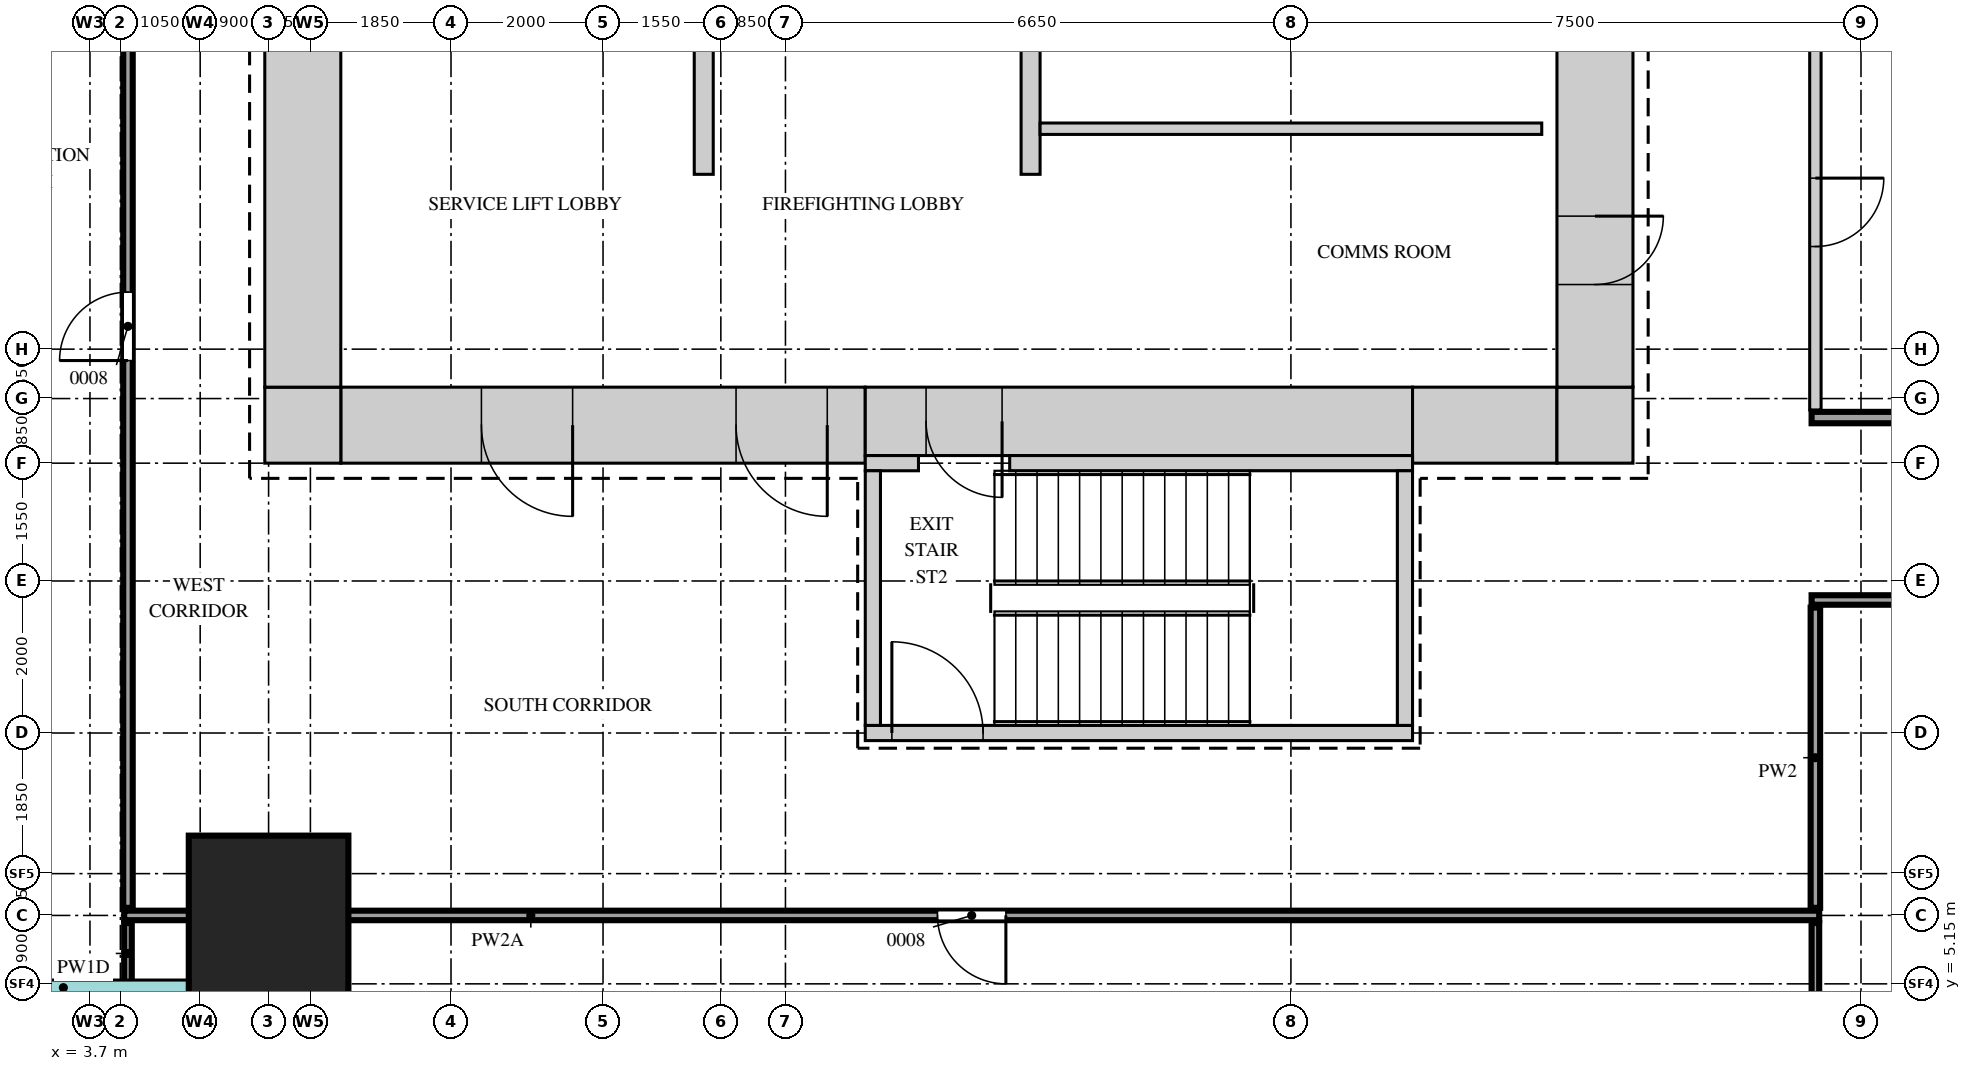
"""IFC4 building model, lengths in metres.
Left out: names, types, materials, properties, quantities, classifications, styles, units other than length and angle.
Written with IfcOpenShell. Run it as: python <this file> out.ifc"""

import sys

from ifc_helpers import new_model, si_unit, direction, frame, frame_2d, origin, origin_2d, place, context, subcontext, project, spatial, rectangle, extrude, source, transform, mapped, element, fill, save


model = new_model("IFC4")
c1 = context("Model", 3, precision=1e-05, world=origin(), true_north=direction((0.0, 1.0)))
c2 = subcontext(c1, "Body", "Model", "MODEL_VIEW")
j1 = project(units=[si_unit("LENGTHUNIT", "METRE"), si_unit("PLANEANGLEUNIT", "RADIAN")], contexts=[c1])
p1 = place(None, origin())
s1 = spatial("IfcSite", under=j1, at=p1, CompositionType="ELEMENT")
p2 = place(p1, origin())
s2 = spatial("IfcBuilding", under=s1, at=p2, CompositionType="ELEMENT")
p3 = place(p2, frame((0.0, 0.0, 136.7)))
s3 = spatial("IfcBuildingStorey", under=s2, at=p3, CompositionType="ELEMENT", Elevation=136.7)
m1 = source(origin(), c2, "Body", "SweptSolid", [
    extrude(rectangle(XDim=6.9, YDim=1.0, at=frame_2d((3.45, 0.0))), origin(), (0.0, 0.0, 1.0), 4.1),
])
p4 = place(p3, frame((7.0, 12.5, 0.0), z_axis=(0.0, 0.0, 1.0), x_axis=(1.0, 0.0, 0.0)))
e1 = element("IfcWall", 1, at=p4, inside=s3, PredefinedType="SHEAR", context=c2, shape_type="MappedRepresentation", body=[
    mapped(m1, transform((0.0, 0.0, 0.0))),
])
m2 = source(origin(), c2, "Body", "SweptSolid", [
    extrude(rectangle(XDim=1.2, YDim=2.1, at=frame_2d((0.6, 1.05))), frame((0.0, 0.51, 0.0), z_axis=(0.0, -1.0, 0.0), x_axis=(1.0, 0.0, 0.0)), (0.0, 0.0, 1.0), 1.02),
])
p5 = place(p4, frame((5.2, 0.0, 0.0)))
e2 = element("IfcOpeningElement", 2, at=p5, cuts=e1, PredefinedType="OPENING", context=c2, shape_type="MappedRepresentation", body=[
    mapped(m2, transform((0.0, 0.0, 0.0))),
])
p6 = place(p4, frame((1.85, 0.0, 0.0)))
e3 = element("IfcOpeningElement", 3, at=p6, cuts=e1, PredefinedType="OPENING", context=c2, shape_type="MappedRepresentation", body=[
    mapped(m2, transform((0.0, 0.0, 0.0))),
])
m3 = source(origin(), c2, "Body", "SweptSolid", [
    extrude(rectangle(XDim=7.2, YDim=0.9, at=frame_2d((3.6, 0.0))), origin(), (0.0, 0.0, 1.0), 4.1),
])
p7 = place(p3, frame((13.9, 12.55, 0.0), z_axis=(0.0, 0.0, 1.0), x_axis=(1.0, 0.0, 0.0)))
e4 = element("IfcWall", 4, at=p7, inside=s3, PredefinedType="SHEAR", context=c2, shape_type="MappedRepresentation", body=[
    mapped(m3, transform((0.0, 0.0, 0.0))),
])
m4 = source(origin(), c2, "Body", "SweptSolid", [
    extrude(rectangle(XDim=1.0, YDim=2.1, at=frame_2d((0.5, 1.05))), frame((0.0, 0.46, 0.0), z_axis=(0.0, -1.0, 0.0), x_axis=(1.0, 0.0, 0.0)), (0.0, 0.0, 1.0), 0.92),
])
p8 = place(p7, frame((0.8, 0.0, 0.0)))
e5 = element("IfcOpeningElement", 5, at=p8, cuts=e4, PredefinedType="OPENING", context=c2, shape_type="MappedRepresentation", body=[
    mapped(m4, transform((0.0, 0.0, 0.0))),
])
m5 = source(origin(), c2, "Body", "SweptSolid", [
    extrude(rectangle(XDim=1.9, YDim=1.0, at=frame_2d((0.95, 0.0))), origin(), (0.0, 0.0, 1.0), 4.1),
])
p9 = place(p3, frame((21.1, 12.5, 0.0), z_axis=(0.0, 0.0, 1.0), x_axis=(1.0, 0.0, 0.0)))
e6 = element("IfcWall", 6, at=p9, inside=s3, PredefinedType="SHEAR", context=c2, shape_type="MappedRepresentation", body=[
    mapped(m5, transform((0.0, 0.0, 0.0))),
])
m6 = source(origin(), c2, "Body", "SweptSolid", [
    extrude(rectangle(XDim=1.0, YDim=1.0, at=frame_2d((0.5, 0.0))), origin(), (0.0, 0.0, 1.0), 4.1),
])
for number, where, z_axis, x_axis in (
    (7, (23.0, 12.5, 0.0), (0.0, 0.0, 1.0), (1.0, 0.0, 0.0)),
    (8, (6.0, 12.5, 0.0), (0.0, 0.0, 1.0), (1.0, 0.0, 0.0)),
):
    element("IfcWall", number, at=place(p3, frame(where, z_axis=z_axis, x_axis=x_axis)), inside=s3, PredefinedType="SHEAR", context=c2, shape_type="MappedRepresentation", body=[
        mapped(m6, transform((0.0, 0.0, 0.0))),
    ])
m7 = source(origin(), c2, "Body", "SweptSolid", [
    extrude(rectangle(XDim=28.0, YDim=1.0, at=frame_2d((14.0, 0.0))), origin(), (0.0, 0.0, 1.0), 4.1),
])
p10 = place(p3, frame((23.5, 13.0, 0.0), z_axis=(0.0, 0.0, 1.0), x_axis=(0.0, 1.0, 0.0)))
e9 = element("IfcWall", 9, at=p10, inside=s3, PredefinedType="SHEAR", context=c2, shape_type="MappedRepresentation", body=[
    mapped(m7, transform((0.0, 0.0, 0.0))),
])
m8 = source(origin(), c2, "Body", "SweptSolid", [
    extrude(rectangle(XDim=1.8, YDim=2.1, at=frame_2d((0.9, 1.05))), frame((0.0, 0.51, 0.0), z_axis=(0.0, -1.0, 0.0), x_axis=(1.0, 0.0, 0.0)), (0.0, 0.0, 1.0), 1.02),
])
p11 = place(p10, frame((22.6, 0.0, 0.0)))
e10 = element("IfcOpeningElement", 10, at=p11, cuts=e9, PredefinedType="OPENING", context=c2, shape_type="MappedRepresentation", body=[
    mapped(m8, transform((0.0, 0.0, 0.0))),
])
p12 = place(p10, frame((15.35, 0.0, 0.0)))
e11 = element("IfcOpeningElement", 11, at=p12, cuts=e9, PredefinedType="OPENING", context=c2, shape_type="MappedRepresentation", body=[
    mapped(m2, transform((0.0, 0.0, 0.0))),
])
m9 = source(origin(), c2, "Body", "SweptSolid", [
    extrude(rectangle(XDim=0.9, YDim=2.1, at=frame_2d((0.45, 1.05))), frame((0.0, 0.51, 0.0), z_axis=(0.0, -1.0, 0.0), x_axis=(1.0, 0.0, 0.0)), (0.0, 0.0, 1.0), 1.02),
])
p13 = place(p10, frame((1.35, 0.0, 0.0)))
e12 = element("IfcOpeningElement", 12, at=p13, cuts=e9, PredefinedType="OPENING", context=c2, shape_type="MappedRepresentation", body=[
    mapped(m9, transform((0.0, 0.0, 0.0))),
])
p14 = place(p10, frame((4.55, 0.0, 0.0)))
e13 = element("IfcOpeningElement", 13, at=p14, cuts=e9, PredefinedType="OPENING", context=c2, shape_type="MappedRepresentation", body=[
    mapped(m9, transform((0.0, 0.0, 0.0))),
])
p15 = place(p10, frame((7.8, 0.0, 0.0)))
e14 = element("IfcOpeningElement", 14, at=p15, cuts=e9, PredefinedType="OPENING", context=c2, shape_type="MappedRepresentation", body=[
    mapped(m9, transform((0.0, 0.0, 0.0))),
])
p16 = place(p3, frame((6.5, 13.0, 0.0), z_axis=(0.0, 0.0, 1.0), x_axis=(0.0, 1.0, 0.0)))
e15 = element("IfcWall", 15, at=p16, inside=s3, PredefinedType="SHEAR", context=c2, shape_type="MappedRepresentation", body=[
    mapped(m7, transform((0.0, 0.0, 0.0))),
])
m10 = source(origin(), c2, "Body", "SweptSolid", [
    extrude(rectangle(XDim=0.7, YDim=0.2, at=frame_2d((0.35, 0.0))), origin(), (0.0, 0.0, 1.0), 4.1),
])
p17 = place(p3, frame((13.9, 12.0, 0.0), z_axis=(0.0, 0.0, 1.0), x_axis=(1.0, 0.0, 0.0)))
e16 = element("IfcWall", 16, at=p17, inside=s3, PredefinedType="SHEAR", context=c2, shape_type="MappedRepresentation", body=[
    mapped(m10, transform((0.0, 0.0, 0.0))),
])
m11 = source(origin(), c2, "Body", "SweptSolid", [
    extrude(rectangle(XDim=5.3, YDim=0.2, at=frame_2d((2.65, 0.0))), origin(), (0.0, 0.0, 1.0), 4.1),
])
p18 = place(p3, frame((15.8, 12.0, 0.0), z_axis=(0.0, 0.0, 1.0), x_axis=(1.0, 0.0, 0.0)))
e17 = element("IfcWall", 17, at=p18, inside=s3, PredefinedType="SHEAR", context=c2, shape_type="MappedRepresentation", body=[
    mapped(m11, transform((0.0, 0.0, 0.0))),
])
m12 = source(origin(), c2, "Body", "SweptSolid", [
    extrude(rectangle(XDim=7.2, YDim=0.2, at=frame_2d((3.6, 0.0))), origin(), (0.0, 0.0, 1.0), 4.1),
])
p19 = place(p3, frame((13.9, 8.45, 0.0), z_axis=(0.0, 0.0, 1.0), x_axis=(1.0, 0.0, 0.0)))
e18 = element("IfcWall", 18, at=p19, inside=s3, PredefinedType="SHEAR", context=c2, shape_type="MappedRepresentation", body=[
    mapped(m12, transform((0.0, 0.0, 0.0))),
])
m13 = source(origin(), c2, "Body", "SweptSolid", [
    extrude(rectangle(XDim=1.2, YDim=2.1, at=frame_2d((0.6, 1.05))), frame((0.0, 0.11, 0.0), z_axis=(0.0, -1.0, 0.0), x_axis=(1.0, 0.0, 0.0)), (0.0, 0.0, 1.0), 0.22),
])
p20 = place(p19, frame((0.35, 0.0, 0.0)))
e19 = element("IfcOpeningElement", 19, at=p20, cuts=e18, PredefinedType="OPENING", context=c2, shape_type="MappedRepresentation", body=[
    mapped(m13, transform((0.0, 0.0, 0.0))),
])
m14 = source(origin(), c2, "Body", "SweptSolid", [
    extrude(rectangle(XDim=3.35, YDim=0.2, at=frame_2d((1.675, 0.0))), origin(), (0.0, 0.0, 1.0), 4.1),
])
for number, where, z_axis, x_axis in (
    (20, (21.0, 8.55, 0.0), (0.0, 0.0, 1.0), (0.0, 1.0, 0.0)),
    (21, (14.0, 8.55, 0.0), (0.0, 0.0, 1.0), (0.0, 1.0, 0.0)),
):
    element("IfcWall", number, at=place(p3, frame(where, z_axis=z_axis, x_axis=x_axis)), inside=s3, PredefinedType="SHEAR", context=c2, shape_type="MappedRepresentation", body=[
        mapped(m14, transform((0.0, 0.0, 0.0))),
    ])
m15 = source(origin(), c2, "Body", "SweptSolid", [
    extrude(rectangle(XDim=3.4, YDim=0.25, at=frame_2d((1.7, 0.0))), origin(), (0.0, 0.0, 1.0), 4.1),
])
for number, where, z_axis, x_axis in (
    (22, (16.075, 15.8, 0.0), (0.0, 0.0, 1.0), (0.0, 1.0, 0.0)),
    (23, (11.775, 15.8, 0.0), (0.0, 0.0, 1.0), (0.0, 1.0, 0.0)),
):
    element("IfcWall", number, at=place(p3, frame(where, z_axis=z_axis, x_axis=x_axis)), inside=s3, PredefinedType="STANDARD", context=c2, shape_type="MappedRepresentation", body=[
        mapped(m15, transform((0.0, 0.0, 0.0))),
    ])
m16 = source(origin(), c2, "Body", "SweptSolid", [
    extrude(rectangle(XDim=2.1, YDim=2.1, at=origin_2d()), origin(), (0.0, 0.0, 1.0), 4.4),
])
p21 = place(p3, frame((6.05, 6.05, 0.0), z_axis=(0.0, 0.0, 1.0), x_axis=(1.0, 0.0, 0.0)))
e24 = element("IfcColumn", 24, at=p21, inside=s3, PredefinedType="COLUMN", context=c2, shape_type="MappedRepresentation", body=[
    mapped(m16, transform((0.0, 0.0, 0.0))),
])
m17 = source(origin(), c2, "Body", "SweptSolid", [
    extrude(rectangle(XDim=4.3, YDim=0.1, at=frame_2d((2.15, 0.0))), origin(), (0.0, 0.0, 1.0), 4.2),
])
p22 = place(p3, frame((26.4, 1.65, 0.0), z_axis=(0.0, 0.0, 1.0), x_axis=(0.0, 1.0, 0.0)))
e25 = element("IfcWall", 25, at=p22, inside=s3, PredefinedType="PARTITIONING", context=c2, shape_type="MappedRepresentation", body=[
    mapped(m17, transform((0.0, 0.0, 0.0))),
])
m18 = source(origin(), c2, "Body", "SweptSolid", [
    extrude(rectangle(XDim=0.8, YDim=0.1, at=frame_2d((0.4, 0.0))), origin(), (0.0, 0.0, 1.0), 4.2),
])
p23 = place(p3, frame((4.2, 5.15, 0.0), z_axis=(0.0, 0.0, 1.0), x_axis=(0.0, 1.0, 0.0)))
e26 = element("IfcWall", 26, at=p23, inside=s3, PredefinedType="PARTITIONING", context=c2, shape_type="MappedRepresentation", body=[
    mapped(m18, transform((0.0, 0.0, 0.0))),
])
m19 = source(origin(), c2, "Body", "SweptSolid", [
    extrude(rectangle(XDim=22.3, YDim=0.125, at=frame_2d((11.15, 0.0))), origin(), (0.0, 0.0, 1.0), 3.55),
])
p24 = place(p3, frame((4.15, 6.05, 0.0), z_axis=(0.0, 0.0, 1.0), x_axis=(1.0, 0.0, 0.0)))
e27 = element("IfcWall", 27, at=p24, inside=s3, PredefinedType="PARTITIONING", context=c2, shape_type="MappedRepresentation", body=[
    mapped(m19, transform((0.0, 0.0, 0.0))),
])
m20 = source(origin(), c2, "Body", "SweptSolid", [
    extrude(rectangle(XDim=0.9, YDim=2.1, at=frame_2d((0.45, 1.05))), frame((0.0, 0.073, 0.0), z_axis=(0.0, -1.0, 0.0), x_axis=(1.0, 0.0, 0.0)), (0.0, 0.0, 1.0), 0.145),
])
p25 = place(p24, frame((10.7, 0.0, 0.0)))
e28 = element("IfcOpeningElement", 28, at=p25, cuts=e27, PredefinedType="OPENING", context=c2, shape_type="MappedRepresentation", body=[
    mapped(m20, transform((0.0, 0.0, 0.0))),
])
m21 = source(origin(), c2, "Body", "SweptSolid", [
    extrude(rectangle(XDim=21.15, YDim=0.125, at=frame_2d((10.575, 0.0))), origin(), (0.0, 0.0, 1.0), 4.2),
])
p26 = place(p3, frame((4.2, 6.15, 0.0), z_axis=(0.0, 0.0, 1.0), x_axis=(0.0, 1.0, 0.0)))
e29 = element("IfcWall", 29, at=p26, inside=s3, PredefinedType="PARTITIONING", context=c2, shape_type="MappedRepresentation", body=[
    mapped(m21, transform((0.0, 0.0, 0.0))),
])
p27 = place(p26, frame((7.2, 0.0, 0.0)))
e30 = element("IfcOpeningElement", 30, at=p27, cuts=e29, PredefinedType="OPENING", context=c2, shape_type="MappedRepresentation", body=[
    mapped(m20, transform((0.0, 0.0, 0.0))),
])
p28 = place(p26, frame((16.8, 0.0, 0.0)))
e31 = element("IfcOpeningElement", 31, at=p28, cuts=e29, PredefinedType="OPENING", context=c2, shape_type="MappedRepresentation", body=[
    mapped(m20, transform((0.0, 0.0, 0.0))),
])
m22 = source(origin(), c2, "Body", "SweptSolid", [
    extrude(rectangle(XDim=3.95, YDim=0.125, at=frame_2d((1.975, 0.0))), origin(), (0.0, 0.0, 1.0), 4.2),
])
p29 = place(p3, frame((26.4, 6.15, 0.0), z_axis=(0.0, 0.0, 1.0), x_axis=(0.0, 1.0, 0.0)))
e32 = element("IfcWall", 32, at=p29, inside=s3, PredefinedType="PARTITIONING", context=c2, shape_type="MappedRepresentation", body=[
    mapped(m22, transform((0.0, 0.0, 0.0))),
])
m23 = source(origin(), c2, "Body", "SweptSolid", [
    extrude(rectangle(XDim=20.0, YDim=0.125, at=frame_2d((10.0, 0.0))), origin(), (0.0, 0.0, 1.0), 4.2),
])
p30 = place(p3, frame((26.35, 10.2, 0.0), z_axis=(0.0, 0.0, 1.0), x_axis=(1.0, 0.0, 0.0)))
e33 = element("IfcWall", 33, at=p30, inside=s3, PredefinedType="PARTITIONING", context=c2, shape_type="MappedRepresentation", body=[
    mapped(m23, transform((0.0, 0.0, 0.0))),
])
m24 = source(origin(), c2, "Body", "SweptSolid", [
    extrude(rectangle(XDim=1.2, YDim=2.1, at=frame_2d((0.6, 1.05))), frame((0.0, 0.073, 0.0), z_axis=(0.0, -1.0, 0.0), x_axis=(1.0, 0.0, 0.0)), (0.0, 0.0, 1.0), 0.145),
])
p31 = place(p30, frame((3.5, 0.0, 0.0)))
e34 = element("IfcOpeningElement", 34, at=p31, cuts=e33, PredefinedType="OPENING", context=c2, shape_type="MappedRepresentation", body=[
    mapped(m24, transform((0.0, 0.0, 0.0))),
])
p32 = place(p30, frame((12.3, 0.0, 0.0)))
e35 = element("IfcOpeningElement", 35, at=p32, cuts=e33, PredefinedType="OPENING", context=c2, shape_type="MappedRepresentation", body=[
    mapped(m24, transform((0.0, 0.0, 0.0))),
])
m25 = source(origin(), c2, "Body", "SweptSolid", [
    extrude(rectangle(XDim=17.7, YDim=0.15, at=frame_2d((8.85, 0.0))), origin(), (0.0, 0.0, 1.0), 4.2),
])
p33 = place(p3, frame((26.35, 12.6, 0.0), z_axis=(0.0, 0.0, 1.0), x_axis=(1.0, 0.0, 0.0)))
e36 = element("IfcWall", 36, at=p33, inside=s3, PredefinedType="PARTITIONING", context=c2, shape_type="MappedRepresentation", body=[
    mapped(m25, transform((0.0, 0.0, 0.0))),
])
m26 = source(origin(), c2, "Body", "SweptSolid", [
    extrude(rectangle(XDim=5.2, YDim=0.15, at=frame_2d((2.6, 0.0))), origin(), (0.0, 0.0, 1.0), 4.2),
])
p34 = place(p3, frame((26.4, 12.7, 0.0), z_axis=(0.0, 0.0, 1.0), x_axis=(0.0, 1.0, 0.0)))
e37 = element("IfcWall", 37, at=p34, inside=s3, PredefinedType="PARTITIONING", context=c2, shape_type="MappedRepresentation", body=[
    mapped(m26, transform((0.0, 0.0, 0.0))),
])
m27 = source(origin(), c2, "Body", "SweptSolid", [
    extrude(rectangle(XDim=0.9, YDim=2.1, at=frame_2d((0.45, 1.05))), frame((0.0, 0.085, 0.0), z_axis=(0.0, -1.0, 0.0), x_axis=(1.0, 0.0, 0.0)), (0.0, 0.0, 1.0), 0.17),
])
p35 = place(p34, frame((2.15, 0.0, 0.0)))
e38 = element("IfcOpeningElement", 38, at=p35, cuts=e37, PredefinedType="OPENING", context=c2, shape_type="MappedRepresentation", body=[
    mapped(m27, transform((0.0, 0.0, 0.0))),
])
m28 = source(origin(), c2, "Body", "SweptSolid", [
    extrude(rectangle(XDim=6.6, YDim=0.15, at=frame_2d((3.3, 0.0))), origin(), (0.0, 0.0, 1.0), 4.2),
])
p36 = place(p3, frame((16.2, 16.4, 0.0), z_axis=(0.0, 0.0, 1.0), x_axis=(1.0, 0.0, 0.0)))
e39 = element("IfcWall", 39, at=p36, inside=s3, PredefinedType="PARTITIONING", context=c2, shape_type="MappedRepresentation", body=[
    mapped(m28, transform((0.0, 0.0, 0.0))),
])
m29 = source(origin(), c2, "Body", "SweptSolid", [
    extrude(rectangle(XDim=0.9, YDim=2.1, at=frame_2d((0.45, 1.05))), frame((0.0, 0.45, 0.0), z_axis=(0.0, -1.0, 0.0), x_axis=(1.0, 0.0, 0.0)), (0.0, 0.0, 1.0), 0.9),
])
p37 = place(p13, origin())
e40 = element("IfcDoor", 40, at=p37, inside=s3, OperationType="SINGLE_SWING_RIGHT", PredefinedType="DOOR", context=c2, shape_type="MappedRepresentation", body=[
    mapped(m29, transform((0.0, 0.0, 0.0))),
])
fill(e12, e40)
m30 = source(origin(), c2, "Body", "SweptSolid", [
    extrude(rectangle(XDim=1.2, YDim=2.1, at=frame_2d((0.6, 1.05))), frame((0.0, 0.45, 0.0), z_axis=(0.0, -1.0, 0.0), x_axis=(1.0, 0.0, 0.0)), (0.0, 0.0, 1.0), 0.9),
])
p38 = place(p5, origin())
e41 = element("IfcDoor", 41, at=p38, inside=s3, OperationType="SINGLE_SWING_RIGHT", PredefinedType="DOOR", context=c2, shape_type="MappedRepresentation", body=[
    mapped(m30, transform((0.0, 0.0, 0.0))),
])
fill(e2, e41)
p39 = place(p6, origin())
e42 = element("IfcDoor", 42, at=p39, inside=s3, OperationType="SINGLE_SWING_RIGHT", PredefinedType="DOOR", context=c2, shape_type="MappedRepresentation", body=[
    mapped(m30, transform((0.0, 0.0, 0.0))),
])
fill(e3, e42)
m31 = source(origin(), c2, "Body", "SweptSolid", [
    extrude(rectangle(XDim=1.0, YDim=2.1, at=frame_2d((0.5, 1.05))), frame((0.0, 0.4, 0.0), z_axis=(0.0, -1.0, 0.0), x_axis=(1.0, 0.0, 0.0)), (0.0, 0.0, 1.0), 0.8),
])
p40 = place(p8, origin())
e43 = element("IfcDoor", 43, at=p40, inside=s3, OperationType="SINGLE_SWING_RIGHT", PredefinedType="DOOR", context=c2, shape_type="MappedRepresentation", body=[
    mapped(m31, transform((0.0, 0.0, 0.0))),
])
fill(e5, e43)
m32 = source(origin(), c2, "Body", "SweptSolid", [
    extrude(rectangle(XDim=0.9, YDim=2.1, at=frame_2d((0.45, 1.05))), frame((0.0, 0.025, 0.0), z_axis=(0.0, -1.0, 0.0), x_axis=(1.0, 0.0, 0.0)), (0.0, 0.0, 1.0), 0.05),
])
p41 = place(p25, origin())
e44 = element("IfcDoor", 44, at=p41, inside=s3, OperationType="SINGLE_SWING_RIGHT", PredefinedType="DOOR", context=c2, shape_type="MappedRepresentation", body=[
    mapped(m32, transform((0.0, 0.0, 0.0))),
])
fill(e28, e44)
p42 = place(p27, origin())
e45 = element("IfcDoor", 45, at=p42, inside=s3, OperationType="SINGLE_SWING_RIGHT", PredefinedType="DOOR", context=c2, shape_type="MappedRepresentation", body=[
    mapped(m32, transform((0.0, 0.0, 0.0))),
])
fill(e30, e45)
p43 = place(p35, origin())
e46 = element("IfcDoor", 46, at=p43, inside=s3, OperationType="SINGLE_SWING_RIGHT", PredefinedType="DOOR", context=c2, shape_type="MappedRepresentation", body=[
    mapped(m32, transform((0.0, 0.0, 0.0))),
])
fill(e38, e46)
m33 = source(origin(), c2, "Body", "SweptSolid", [
    extrude(rectangle(XDim=1.2, YDim=2.1, at=frame_2d((0.6, 1.05))), frame((0.0, 0.025, 0.0), z_axis=(0.0, -1.0, 0.0), x_axis=(1.0, 0.0, 0.0)), (0.0, 0.0, 1.0), 0.05),
])
p44 = place(p20, origin())
e47 = element("IfcDoor", 47, at=p44, inside=s3, OperationType="SINGLE_SWING_RIGHT", PredefinedType="DOOR", context=c2, shape_type="MappedRepresentation", body=[
    mapped(m33, transform((0.0, 0.0, 0.0))),
])
fill(e19, e47)
save(model, sys.argv[1])
